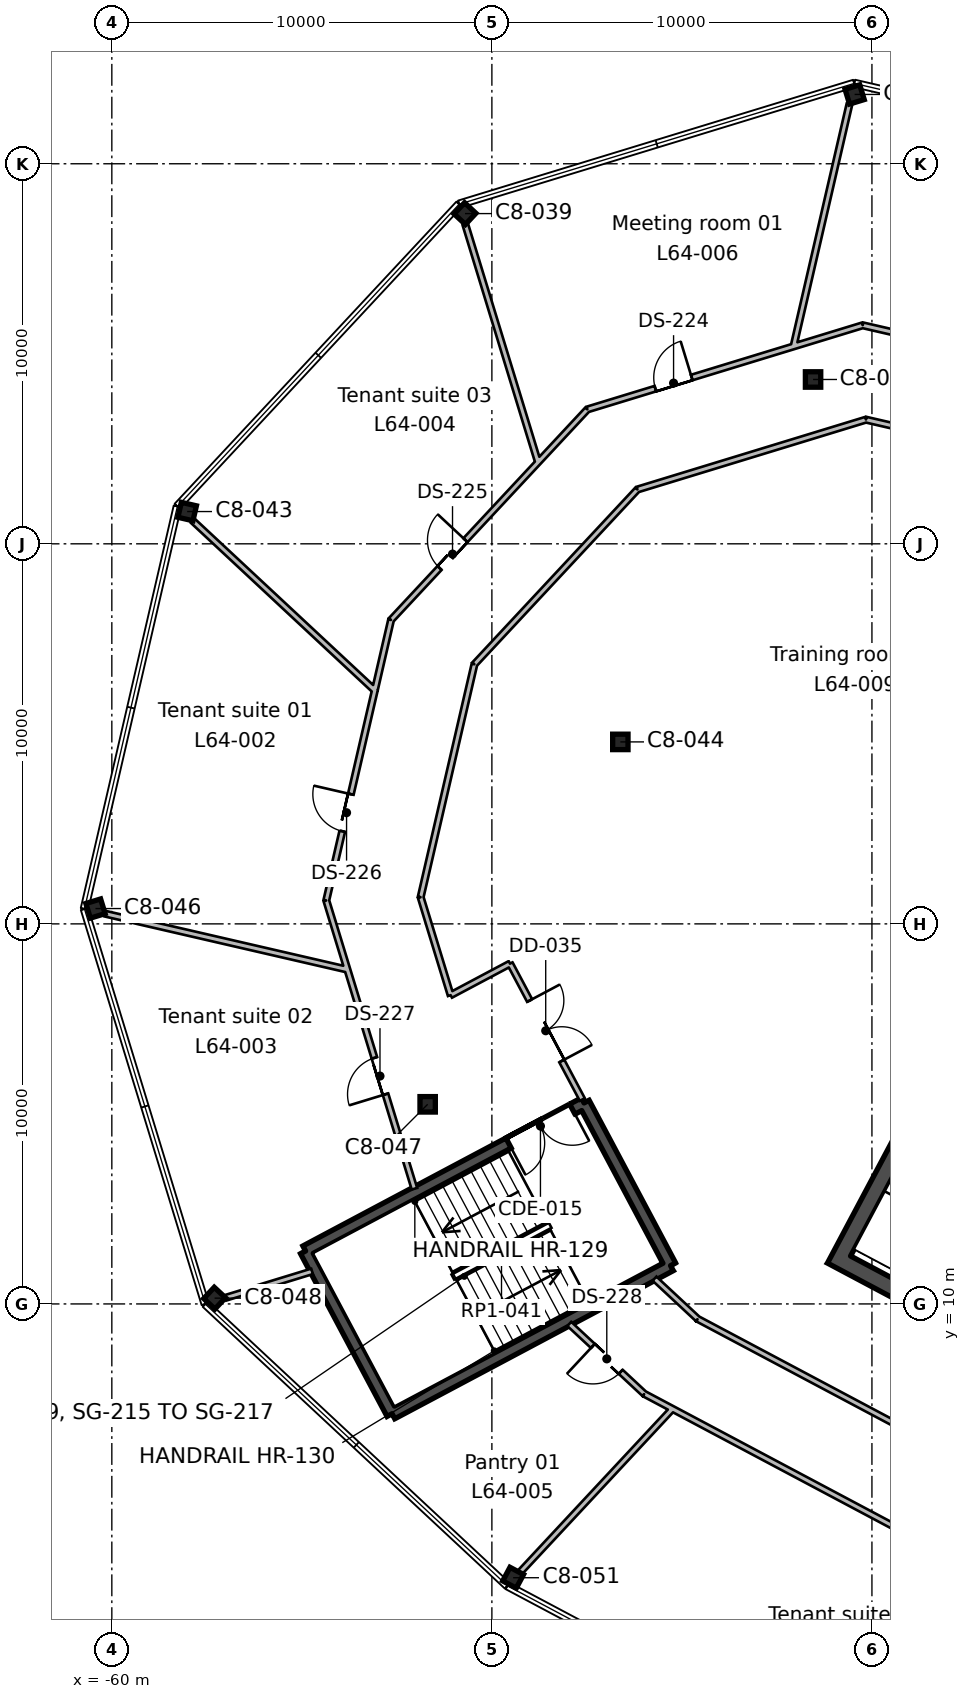
"""IFC4 building model, lengths in metres.
Left out: names, types, materials, properties, quantities, classifications, styles, units other than length and angle.
Written with IfcOpenShell. Run it as: python <this file> out.ifc"""

import sys

from ifc_helpers import new_model, si_unit, direction, frame, frame_2d, origin, origin_2d, place, context, subcontext, project, spatial, rectangle, i_section, extrude, element, fill, save


model = new_model("IFC4")
c1 = context("Model", 3, precision=1e-05, world=origin(), true_north=direction((0.0, 1.0)))
c2 = subcontext(c1, "Body", "Model", "MODEL_VIEW")
j1 = project(units=[si_unit("LENGTHUNIT", "METRE"), si_unit("PLANEANGLEUNIT", "RADIAN")], contexts=[c1])
p1 = place(None, origin())
s1 = spatial("IfcSite", under=j1, at=p1, CompositionType="ELEMENT")
p2 = place(p1, origin())
s2 = spatial("IfcBuilding", under=s1, at=p2, CompositionType="ELEMENT")
p3 = place(p2, frame((0.0, 0.0, 285.3)))
s3 = spatial("IfcBuildingStorey", under=s2, at=p3, CompositionType="ELEMENT", Elevation=285.3)
for number, where, z_axis, x_axis in (
    (1, (-49.441, 2.796, 0.0), (0.0, 0.0, 1.0), (0.883, -0.469, 0.0)),
    (2, (-57.296, 10.152, 0.0), (0.0, 0.0, 1.0), (0.731, -0.682, 0.0)),
    (3, (-51.69, 15.252, 0.0), (0.0, 0.0, 1.0), (1.0, 0.0, 0.0)),
    (4, (-60.43, 20.403, 0.0), (0.0, 0.0, 1.0), (0.292, -0.956, 0.0)),
    (5, (-46.62, 24.788, 0.0), (0.0, 0.0, 1.0), (1.0, 0.0, 0.0)),
    (6, (-58.018, 30.849, 0.0), (0.0, 0.0, 1.0), (-0.225, -0.974, 0.0)),
    (7, (-41.549, 34.324, 0.0), (0.0, 0.0, 1.0), (1.0, 0.0, 0.0)),
    (8, (-50.707, 38.689, 0.0), (0.0, 0.0, 1.0), (-0.682, -0.731, 0.0)),
    (9, (-40.455, 41.824, 0.0), (0.0, 0.0, 1.0), (-0.956, -0.292, 0.0)),
):
    element("IfcColumn", number, at=place(p3, frame(where, z_axis=z_axis, x_axis=x_axis)), inside=s3, PredefinedType="COLUMN", context=c2, shape_type="SweptSolid", body=[
        extrude(i_section(OverallWidth=0.404, OverallDepth=0.406, WebThickness=0.027, FlangeThickness=0.044, FilletRadius=0.015, at=origin_2d()), origin(), (0.0, 0.0, 1.0), 3.9),
    ])
p4 = place(p3, frame((-32.004, 27.833, 0.0), z_axis=(0.0, 0.0, 1.0), x_axis=(-0.469467968382, -0.882949504028, 0.0)))
e10 = element("IfcWall", 10, at=p4, inside=s3, PredefinedType="SHEAR", context=c2, shape_type="SweptSolid", body=[
    extrude(rectangle(XDim=19.1, YDim=0.45, at=frame_2d((9.55, 0.0))), origin(), (0.0, 0.0, 1.0), 3.9),
])
p5 = place(p4, frame((10.15, 0.0, 0.0)))
e11 = element("IfcOpeningElement", 11, at=p5, cuts=e10, PredefinedType="OPENING", context=c2, shape_type="SweptSolid", body=[
    extrude(rectangle(XDim=2.4, YDim=2.4, at=frame_2d((1.2, 1.2))), frame((0.0, 0.235, 0.0), z_axis=(0.0, -1.0, 0.0), x_axis=(1.0, 0.0, 0.0)), (0.0, 0.0, 1.0), 0.47),
])
p6 = place(p3, frame((-22.832, 1.578, 0.0), z_axis=(0.0, 0.0, 1.0), x_axis=(-0.88294509198, 0.469476266226, 0.0)))
e12 = element("IfcWall", 12, at=p6, inside=s3, PredefinedType="SHEAR", context=c2, shape_type="SweptSolid", body=[
    extrude(rectangle(XDim=20.2, YDim=0.45, at=frame_2d((10.1, 0.0))), origin(), (0.0, 0.0, 1.0), 3.9),
])
p7 = place(p3, frame((-47.574, 15.29, 0.0), z_axis=(0.0, 0.0, 1.0), x_axis=(0.469443498566, -0.882962514297, 0.0)))
e13 = element("IfcWall", 13, at=p7, inside=s3, PredefinedType="SHEAR", context=c2, shape_type="SweptSolid", body=[
    extrude(rectangle(XDim=4.85, YDim=0.3, at=frame_2d((2.425, 0.0))), origin(), (0.0, 0.0, 1.0), 3.9),
])
p8 = place(p3, frame((-45.297, 11.007, 0.0), z_axis=(0.0, 0.0, 1.0), x_axis=(-0.882951519127, -0.469464178475, 0.0)))
e14 = element("IfcWall", 14, at=p8, inside=s3, PredefinedType="SHEAR", context=c2, shape_type="SweptSolid", body=[
    extrude(rectangle(XDim=8.3, YDim=0.3, at=frame_2d((4.15, 0.0))), origin(), (0.0, 0.0, 1.0), 3.9),
])
p9 = place(p3, frame((-52.626, 7.111, 0.0), z_axis=(0.0, 0.0, 1.0), x_axis=(-0.469464364128, 0.882951420416, 0.0)))
e15 = element("IfcWall", 15, at=p9, inside=s3, PredefinedType="SHEAR", context=c2, shape_type="SweptSolid", body=[
    extrude(rectangle(XDim=4.85, YDim=0.3, at=frame_2d((2.425, 0.0))), origin(), (0.0, 0.0, 1.0), 3.9),
])
p10 = place(p3, frame((-54.903, 11.393, 0.0), z_axis=(0.0, 0.0, 1.0), x_axis=(0.882939326045, 0.469487110071, 0.0)))
e16 = element("IfcWall", 16, at=p10, inside=s3, PredefinedType="SHEAR", context=c2, shape_type="SweptSolid", body=[
    extrude(rectangle(XDim=8.3, YDim=0.3, at=frame_2d((4.15, 0.0))), origin(), (0.0, 0.0, 1.0), 3.9),
])
p11 = place(p10, frame((6.05, 0.0, 0.0)))
e17 = element("IfcOpeningElement", 17, at=p11, cuts=e16, PredefinedType="OPENING", context=c2, shape_type="SweptSolid", body=[
    extrude(rectangle(XDim=1.9, YDim=2.1, at=frame_2d((0.95, 1.05))), frame((0.0, 0.16, 0.0), z_axis=(0.0, -1.0, 0.0), x_axis=(1.0, 0.0, 0.0)), (0.0, 0.0, 1.0), 0.32),
])
p12 = place(p3, frame((-53.8, 18.796, 0.0), z_axis=(0.0, 0.0, 1.0), x_axis=(-0.974354729311, 0.225017469254, 0.0)))
e18 = element("IfcWall", 18, at=p12, inside=s3, PredefinedType="PARTITIONING", context=c2, shape_type="SweptSolid", body=[
    extrude(rectangle(XDim=6.547, YDim=0.15, at=frame_2d((3.273, 0.0))), origin(), (0.0, 0.0, 1.0), 3.54),
])
p13 = place(p3, frame((-57.872, 30.608, 0.0), z_axis=(0.0, 0.0, 1.0), x_axis=(0.731496401804, -0.681845300744, 0.0)))
e19 = element("IfcWall", 19, at=p13, inside=s3, PredefinedType="PARTITIONING", context=c2, shape_type="SweptSolid", body=[
    extrude(rectangle(XDim=6.55, YDim=0.15, at=frame_2d((3.275, 0.0))), origin(), (0.0, 0.0, 1.0), 3.54),
])
p14 = place(p3, frame((-54.732, 10.857, 0.0), z_axis=(0.0, 0.0, 1.0), x_axis=(-0.956231519395, -0.292611143525, 0.0)))
e20 = element("IfcWall", 20, at=p14, inside=s3, PredefinedType="PARTITIONING", context=c2, shape_type="SweptSolid", body=[
    extrude(rectangle(XDim=2.385, YDim=0.15, at=frame_2d((1.193, 0.0))), origin(), (0.0, 0.0, 1.0), 3.54),
])
p15 = place(p3, frame((-53.295, 25.215, 0.0), z_axis=(0.0, 0.0, 1.0), x_axis=(-0.224995495587, -0.974359803648, 0.0)))
e21 = element("IfcWall", 21, at=p15, inside=s3, PredefinedType="PARTITIONING", context=c2, shape_type="SweptSolid", body=[
    extrude(rectangle(XDim=4.72, YDim=0.15, at=frame_2d((2.36, 0.0))), origin(), (0.0, 0.0, 1.0), 3.54),
])
p16 = place(p15, frame((1.85, 0.0, 0.0)))
e22 = element("IfcOpeningElement", 22, at=p16, cuts=e21, PredefinedType="OPENING", context=c2, shape_type="SweptSolid", body=[
    extrude(rectangle(XDim=1.0, YDim=2.1, at=frame_2d((0.5, 1.05))), frame((0.0, 0.085, 0.0), z_axis=(0.0, -1.0, 0.0), x_axis=(1.0, 0.0, 0.0)), (0.0, 0.0, 1.0), 0.17),
])
p17 = place(p3, frame((-54.357, 20.616, 0.0), z_axis=(0.0, 0.0, 1.0), x_axis=(0.29225817084, -0.956339459385, 0.0)))
e23 = element("IfcWall", 23, at=p17, inside=s3, PredefinedType="PARTITIONING", context=c2, shape_type="SweptSolid", body=[
    extrude(rectangle(XDim=1.878, YDim=0.15, at=frame_2d((0.939, 0.0))), origin(), (0.0, 0.0, 1.0), 3.54),
])
p18 = place(p3, frame((-52.038, 13.031, 0.0), z_axis=(0.0, 0.0, 1.0), x_axis=(-0.29239066517, 0.956298958967, 0.0)))
e24 = element("IfcWall", 24, at=p18, inside=s3, PredefinedType="PARTITIONING", context=c2, shape_type="SweptSolid", body=[
    extrude(rectangle(XDim=6.054, YDim=0.15, at=frame_2d((3.027, 0.0))), origin(), (0.0, 0.0, 1.0), 3.54),
])
p19 = place(p18, frame((2.6, 0.0, 0.0)))
e25 = element("IfcOpeningElement", 25, at=p19, cuts=e24, PredefinedType="OPENING", context=c2, shape_type="SweptSolid", body=[
    extrude(rectangle(XDim=1.0, YDim=2.1, at=frame_2d((0.5, 1.05))), frame((0.0, 0.085, 0.0), z_axis=(0.0, -1.0, 0.0), x_axis=(1.0, 0.0, 0.0)), (0.0, 0.0, 1.0), 0.17),
])
p20 = place(p3, frame((-53.295, 25.215, 0.0), z_axis=(0.0, 0.0, 1.0), x_axis=(0.225370986266, 0.974273020539, 0.0)))
e26 = element("IfcWall", 26, at=p20, inside=s3, PredefinedType="PARTITIONING", context=c2, shape_type="SweptSolid", body=[
    extrude(rectangle(XDim=0.976, YDim=0.15, at=frame_2d((0.488, 0.0))), origin(), (0.0, 0.0, 1.0), 3.54),
])
p21 = place(p3, frame((-49.433, 31.449, 0.0), z_axis=(0.0, 0.0, 1.0), x_axis=(-0.682010505986, -0.731342375173, 0.0)))
e27 = element("IfcWall", 27, at=p21, inside=s3, PredefinedType="PARTITIONING", context=c2, shape_type="SweptSolid", body=[
    extrude(rectangle(XDim=4.721, YDim=0.15, at=frame_2d((2.361, 0.0))), origin(), (0.0, 0.0, 1.0), 3.54),
])
p22 = place(p21, frame((1.85, 0.0, 0.0)))
e28 = element("IfcOpeningElement", 28, at=p22, cuts=e27, PredefinedType="OPENING", context=c2, shape_type="SweptSolid", body=[
    extrude(rectangle(XDim=1.0, YDim=2.1, at=frame_2d((0.5, 1.05))), frame((0.0, 0.085, 0.0), z_axis=(0.0, -1.0, 0.0), x_axis=(1.0, 0.0, 0.0)), (0.0, 0.0, 1.0), 0.17),
])
p23 = place(p3, frame((-52.653, 27.996, 0.0), z_axis=(0.0, 0.0, 1.0), x_axis=(-0.224631643858, -0.974443751367, 0.0)))
e29 = element("IfcWall", 29, at=p23, inside=s3, PredefinedType="PARTITIONING", context=c2, shape_type="SweptSolid", body=[
    extrude(rectangle(XDim=1.878, YDim=0.15, at=frame_2d((0.939, 0.0))), origin(), (0.0, 0.0, 1.0), 3.54),
])
p24 = place(p3, frame((-50.7, 38.406, 0.0), z_axis=(0.0, 0.0, 1.0), x_axis=(0.29245059414, -0.95628063349, 0.0)))
e30 = element("IfcWall", 30, at=p24, inside=s3, PredefinedType="PARTITIONING", context=c2, shape_type="SweptSolid", body=[
    extrude(rectangle(XDim=6.548, YDim=0.15, at=frame_2d((3.274, 0.0))), origin(), (0.0, 0.0, 1.0), 3.54),
])
p25 = place(p3, frame((-49.433, 31.449, 0.0), z_axis=(0.0, 0.0, 1.0), x_axis=(0.682014889945, 0.731338286905, 0.0)))
e31 = element("IfcWall", 31, at=p25, inside=s3, PredefinedType="PARTITIONING", context=c2, shape_type="SweptSolid", body=[
    extrude(rectangle(XDim=0.975, YDim=0.15, at=frame_2d((0.488, 0.0))), origin(), (0.0, 0.0, 1.0), 3.54),
])
p26 = place(p3, frame((-45.249, 7.241, 0.0), z_axis=(0.0, 0.0, 1.0), x_axis=(-0.681993289905, -0.731358429584, 0.0)))
e32 = element("IfcWall", 32, at=p26, inside=s3, PredefinedType="PARTITIONING", context=c2, shape_type="SweptSolid", body=[
    extrude(rectangle(XDim=5.89, YDim=0.15, at=frame_2d((2.945, 0.0))), origin(), (0.0, 0.0, 1.0), 3.54),
])
p27 = place(p3, frame((-42.972, 34.916, 0.0), z_axis=(0.0, 0.0, 1.0), x_axis=(-0.956321861231, -0.292315750056, 0.0)))
e33 = element("IfcWall", 33, at=p27, inside=s3, PredefinedType="PARTITIONING", context=c2, shape_type="SweptSolid", body=[
    extrude(rectangle(XDim=4.721, YDim=0.15, at=frame_2d((2.361, 0.0))), origin(), (0.0, 0.0, 1.0), 3.54),
])
p28 = place(p27, frame((1.85, 0.0, 0.0)))
e34 = element("IfcOpeningElement", 34, at=p28, cuts=e33, PredefinedType="OPENING", context=c2, shape_type="SweptSolid", body=[
    extrude(rectangle(XDim=1.0, YDim=2.1, at=frame_2d((0.5, 1.05))), frame((0.0, 0.085, 0.0), z_axis=(0.0, -1.0, 0.0), x_axis=(1.0, 0.0, 0.0)), (0.0, 0.0, 1.0), 0.17),
])
p29 = place(p3, frame((-47.487, 33.536, 0.0), z_axis=(0.0, 0.0, 1.0), x_axis=(-0.681980118274, -0.731370711936, 0.0)))
e35 = element("IfcWall", 35, at=p29, inside=s3, PredefinedType="PARTITIONING", context=c2, shape_type="SweptSolid", body=[
    extrude(rectangle(XDim=1.878, YDim=0.15, at=frame_2d((0.939, 0.0))), origin(), (0.0, 0.0, 1.0), 3.54),
])
p30 = place(p3, frame((-47.621, 15.378, 0.0), z_axis=(0.0, 0.0, 1.0), x_axis=(-0.469542997944, 0.882909606404, 0.0)))
e36 = element("IfcWall", 36, at=p30, inside=s3, PredefinedType="PARTITIONING", context=c2, shape_type="SweptSolid", body=[
    extrude(rectangle(XDim=4.051, YDim=0.15, at=frame_2d((2.025, 0.0))), origin(), (0.0, 0.0, 1.0), 3.54),
])
p31 = place(p30, frame((1.15, 0.0, 0.0)))
e37 = element("IfcOpeningElement", 37, at=p31, cuts=e36, PredefinedType="OPENING", context=c2, shape_type="SweptSolid", body=[
    extrude(rectangle(XDim=1.8, YDim=2.1, at=frame_2d((0.9, 1.05))), frame((0.0, 0.085, 0.0), z_axis=(0.0, -1.0, 0.0), x_axis=(1.0, 0.0, 0.0)), (0.0, 0.0, 1.0), 0.17),
])
p32 = place(p3, frame((-49.523, 18.954, 0.0), z_axis=(0.0, 0.0, 1.0), x_axis=(-0.882826130341, -0.469699929303, 0.0)))
e38 = element("IfcWall", 38, at=p32, inside=s3, PredefinedType="PARTITIONING", context=c2, shape_type="SweptSolid", body=[
    extrude(rectangle(XDim=1.769, YDim=0.15, at=frame_2d((0.885, 0.0))), origin(), (0.0, 0.0, 1.0), 3.54),
])
p33 = place(p3, frame((-51.085, 18.123, 0.0), z_axis=(0.0, 0.0, 1.0), x_axis=(-0.292584201044, 0.9562397635, 0.0)))
e39 = element("IfcWall", 39, at=p33, inside=s3, PredefinedType="PARTITIONING", context=c2, shape_type="SweptSolid", body=[
    extrude(rectangle(XDim=2.697, YDim=0.15, at=frame_2d((1.348, 0.0))), origin(), (0.0, 0.0, 1.0), 3.54),
])
p34 = place(p3, frame((-51.874, 20.702, 0.0), z_axis=(0.0, 0.0, 1.0), x_axis=(0.224987079621, 0.974361746993, 0.0)))
e40 = element("IfcWall", 40, at=p34, inside=s3, PredefinedType="PARTITIONING", context=c2, shape_type="SweptSolid", body=[
    extrude(rectangle(XDim=6.289, YDim=0.15, at=frame_2d((3.145, 0.0))), origin(), (0.0, 0.0, 1.0), 3.54),
])
p35 = place(p3, frame((-50.459, 26.83, 0.0), z_axis=(0.0, 0.0, 1.0), x_axis=(0.68204431976, 0.731310840808, 0.0)))
e41 = element("IfcWall", 41, at=p35, inside=s3, PredefinedType="PARTITIONING", context=c2, shape_type="SweptSolid", body=[
    extrude(rectangle(XDim=6.289, YDim=0.15, at=frame_2d((3.144, 0.0))), origin(), (0.0, 0.0, 1.0), 3.54),
])
p36 = place(p3, frame((-46.17, 31.429, 0.0), z_axis=(0.0, 0.0, 1.0), x_axis=(0.956313885215, 0.292341842616, 0.0)))
e42 = element("IfcWall", 42, at=p36, inside=s3, PredefinedType="PARTITIONING", context=c2, shape_type="SweptSolid", body=[
    extrude(rectangle(XDim=6.288, YDim=0.15, at=frame_2d((3.144, 0.0))), origin(), (0.0, 0.0, 1.0), 3.54),
])
p37 = place(p3, frame((-40.157, 33.267, 0.0), z_axis=(0.0, 0.0, 1.0), x_axis=(0.974363587665, -0.224979107993, 0.0)))
e43 = element("IfcWall", 43, at=p37, inside=s3, PredefinedType="PARTITIONING", context=c2, shape_type="SweptSolid", body=[
    extrude(rectangle(XDim=7.454, YDim=0.15, at=frame_2d((3.727, 0.0))), origin(), (0.0, 0.0, 1.0), 3.54),
])
p38 = place(p3, frame((-13.8, -6.763, 0.0), z_axis=(0.0, 0.0, 1.0), x_axis=(-0.882949839356, 0.469467337716, 0.0)))
e44 = element("IfcWall", 44, at=p38, inside=s3, PredefinedType="PARTITIONING", context=c2, shape_type="SweptSolid", body=[
    extrude(rectangle(XDim=34.865, YDim=0.15, at=frame_2d((17.433, 0.0))), origin(), (0.0, 0.0, 1.0), 3.54),
])
p39 = place(p3, frame((-44.584, 9.605, 0.0), z_axis=(0.0, 0.0, 1.0), x_axis=(-0.731410317478, 0.681937641934, 0.0)))
e45 = element("IfcWall", 45, at=p39, inside=s3, PredefinedType="PARTITIONING", context=c2, shape_type="SweptSolid", body=[
    extrude(rectangle(XDim=1.554, YDim=0.15, at=frame_2d((0.777, 0.0))), origin(), (0.0, 0.0, 1.0), 3.54),
])
p40 = place(p3, frame((-45.299, 7.267, 0.0), z_axis=(0.0, 0.0, 1.0), x_axis=(-0.882897191907, 0.469566340918, 0.0)))
e46 = element("IfcWall", 46, at=p40, inside=s3, PredefinedType="PARTITIONING", context=c2, shape_type="SweptSolid", body=[
    extrude(rectangle(XDim=0.781, YDim=0.15, at=frame_2d((0.391, 0.0))), origin(), (0.0, 0.0, 1.0), 3.54),
])
p41 = place(p3, frame((-45.989, 7.634, 0.0), z_axis=(0.0, 0.0, 1.0), x_axis=(-0.731461293005, 0.681882964178, 0.0)))
e47 = element("IfcWall", 47, at=p41, inside=s3, PredefinedType="PARTITIONING", context=c2, shape_type="SweptSolid", body=[
    extrude(rectangle(XDim=2.698, YDim=0.15, at=frame_2d((1.349, 0.0))), origin(), (0.0, 0.0, 1.0), 3.54),
])
p42 = place(p41, frame((0.85, 0.0, 0.0)))
e48 = element("IfcOpeningElement", 48, at=p42, cuts=e47, PredefinedType="OPENING", context=c2, shape_type="SweptSolid", body=[
    extrude(rectangle(XDim=1.0, YDim=2.1, at=frame_2d((0.5, 1.05))), frame((0.0, 0.085, 0.0), z_axis=(0.0, -1.0, 0.0), x_axis=(1.0, 0.0, 0.0)), (0.0, 0.0, 1.0), 0.17),
])
p43 = place(p3, frame((-13.114, -9.846, 0.0), z_axis=(0.0, 0.0, 1.0), x_axis=(-0.88294829908, 0.469470234575, 0.0)))
e49 = element("IfcWall", 49, at=p43, inside=s3, PredefinedType="PARTITIONING", context=c2, shape_type="SweptSolid", body=[
    extrude(rectangle(XDim=36.452, YDim=0.15, at=frame_2d((18.226, 0.0))), origin(), (0.0, 0.0, 1.0), 3.54),
])
p44 = place(p43, frame((17.75, 0.0, 0.0)))
e50 = element("IfcOpeningElement", 50, at=p44, cuts=e49, PredefinedType="OPENING", context=c2, shape_type="SweptSolid", body=[
    extrude(rectangle(XDim=1.0, YDim=2.1, at=frame_2d((0.5, 1.05))), frame((0.0, 0.085, 0.0), z_axis=(0.0, -1.0, 0.0), x_axis=(1.0, 0.0, 0.0)), (0.0, 0.0, 1.0), 0.17),
])
p45 = place(p3, frame((-42.972, 34.916, 0.0), z_axis=(0.0, 0.0, 1.0), x_axis=(0.956388481043, 0.292097711954, 0.0)))
e51 = element("IfcWall", 51, at=p45, inside=s3, PredefinedType="PARTITIONING", context=c2, shape_type="SweptSolid", body=[
    extrude(rectangle(XDim=0.975, YDim=0.15, at=frame_2d((0.488, 0.0))), origin(), (0.0, 0.0, 1.0), 3.54),
])
p46 = place(p3, frame((-40.59, 41.575, 0.0), z_axis=(0.0, 0.0, 1.0), x_axis=(-0.224916684579, -0.974377999032, 0.0)))
e52 = element("IfcWall", 52, at=p46, inside=s3, PredefinedType="PARTITIONING", context=c2, shape_type="SweptSolid", body=[
    extrude(rectangle(XDim=6.549, YDim=0.15, at=frame_2d((3.274, 0.0))), origin(), (0.0, 0.0, 1.0), 3.54),
])
p47 = place(p3, frame((-34.208, 34.357, 0.0), z_axis=(0.0, 0.0, 1.0), x_axis=(-0.974377242452, 0.224919962192, 0.0)))
e53 = element("IfcWall", 53, at=p47, inside=s3, PredefinedType="PARTITIONING", context=c2, shape_type="SweptSolid", body=[
    extrude(rectangle(XDim=6.194, YDim=0.15, at=frame_2d((3.097, 0.0))), origin(), (0.0, 0.0, 1.0), 3.54),
])
p48 = place(p47, frame((2.55, 0.0, 0.0)))
e54 = element("IfcOpeningElement", 54, at=p48, cuts=e53, PredefinedType="OPENING", context=c2, shape_type="SweptSolid", body=[
    extrude(rectangle(XDim=1.0, YDim=2.1, at=frame_2d((0.5, 1.05))), frame((0.0, 0.085, 0.0), z_axis=(0.0, -1.0, 0.0), x_axis=(1.0, 0.0, 0.0)), (0.0, 0.0, 1.0), 0.17),
])
p49 = place(p3, frame((-40.243, 35.75, 0.0), z_axis=(0.0, 0.0, 1.0), x_axis=(-0.956314227535, -0.292340722812, 0.0)))
e55 = element("IfcWall", 55, at=p49, inside=s3, PredefinedType="PARTITIONING", context=c2, shape_type="SweptSolid", body=[
    extrude(rectangle(XDim=1.878, YDim=0.15, at=frame_2d((0.939, 0.0))), origin(), (0.0, 0.0, 1.0), 3.54),
])
p50 = place(p11, frame((1.9, 0.0, 0.0), z_axis=(0.0, 0.0, 1.0), x_axis=(-1.0, 0.0, 0.0)))
e56 = element("IfcDoor", 56, at=p50, inside=s3, OperationType="DOUBLE_DOOR_SINGLE_SWING", PredefinedType="DOOR", context=c2, shape_type="SweptSolid", body=[
    extrude(rectangle(XDim=1.9, YDim=2.1, at=frame_2d((0.95, 1.05))), frame((0.0, 0.025, 0.0), z_axis=(0.0, -1.0, 0.0), x_axis=(1.0, 0.0, 0.0)), (0.0, 0.0, 1.0), 0.05),
])
fill(e17, e56)
p51 = place(p31, frame((1.8, 0.0, 0.0), z_axis=(0.0, 0.0, 1.0), x_axis=(-1.0, 0.0, 0.0)))
e57 = element("IfcDoor", 57, at=p51, inside=s3, OperationType="DOUBLE_DOOR_SINGLE_SWING", PredefinedType="DOOR", context=c2, shape_type="SweptSolid", body=[
    extrude(rectangle(XDim=1.8, YDim=2.1, at=frame_2d((0.9, 1.05))), frame((0.0, 0.025, 0.0), z_axis=(0.0, -1.0, 0.0), x_axis=(1.0, 0.0, 0.0)), (0.0, 0.0, 1.0), 0.05),
])
fill(e37, e57)
p52 = place(p28, frame((1.0, 0.0, 0.0), z_axis=(0.0, 0.0, 1.0), x_axis=(-1.0, 0.0, 0.0)))
e58 = element("IfcDoor", 58, at=p52, inside=s3, OperationType="SINGLE_SWING_RIGHT", PredefinedType="DOOR", context=c2, shape_type="SweptSolid", body=[
    extrude(rectangle(XDim=1.0, YDim=2.1, at=frame_2d((0.5, 1.05))), frame((0.0, 0.025, 0.0), z_axis=(0.0, -1.0, 0.0), x_axis=(1.0, 0.0, 0.0)), (0.0, 0.0, 1.0), 0.05),
])
fill(e34, e58)
p53 = place(p22, frame((1.0, 0.0, 0.0), z_axis=(0.0, 0.0, 1.0), x_axis=(-1.0, 0.0, 0.0)))
e59 = element("IfcDoor", 59, at=p53, inside=s3, OperationType="SINGLE_SWING_RIGHT", PredefinedType="DOOR", context=c2, shape_type="SweptSolid", body=[
    extrude(rectangle(XDim=1.0, YDim=2.1, at=frame_2d((0.5, 1.05))), frame((0.0, 0.025, 0.0), z_axis=(0.0, -1.0, 0.0), x_axis=(1.0, 0.0, 0.0)), (0.0, 0.0, 1.0), 0.05),
])
fill(e28, e59)
p54 = place(p16, frame((1.0, 0.0, 0.0), z_axis=(0.0, 0.0, 1.0), x_axis=(-1.0, 0.0, 0.0)))
e60 = element("IfcDoor", 60, at=p54, inside=s3, OperationType="SINGLE_SWING_RIGHT", PredefinedType="DOOR", context=c2, shape_type="SweptSolid", body=[
    extrude(rectangle(XDim=1.0, YDim=2.1, at=frame_2d((0.5, 1.05))), frame((0.0, 0.025, 0.0), z_axis=(0.0, -1.0, 0.0), x_axis=(1.0, 0.0, 0.0)), (0.0, 0.0, 1.0), 0.05),
])
fill(e22, e60)
p55 = place(p19, origin())
e61 = element("IfcDoor", 61, at=p55, inside=s3, OperationType="SINGLE_SWING_LEFT", PredefinedType="DOOR", context=c2, shape_type="SweptSolid", body=[
    extrude(rectangle(XDim=1.0, YDim=2.1, at=frame_2d((0.5, 1.05))), frame((0.0, 0.025, 0.0), z_axis=(0.0, -1.0, 0.0), x_axis=(1.0, 0.0, 0.0)), (0.0, 0.0, 1.0), 0.05),
])
fill(e25, e61)
p56 = place(p42, origin())
e62 = element("IfcDoor", 62, at=p56, inside=s3, OperationType="SINGLE_SWING_RIGHT", PredefinedType="DOOR", context=c2, shape_type="SweptSolid", body=[
    extrude(rectangle(XDim=1.0, YDim=2.1, at=frame_2d((0.5, 1.05))), frame((0.0, 0.025, 0.0), z_axis=(0.0, -1.0, 0.0), x_axis=(1.0, 0.0, 0.0)), (0.0, 0.0, 1.0), 0.05),
])
fill(e48, e62)
save(model, sys.argv[1])
